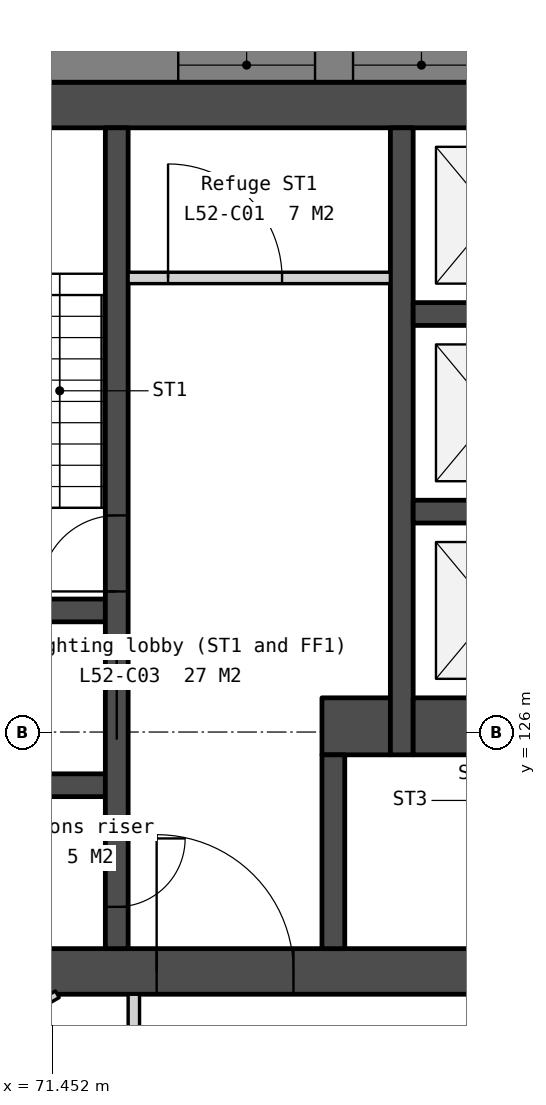
"""IFC4 building model, lengths in metres.
Left out: names, types, materials, properties, quantities, classifications, styles, units other than length and angle.
Written with IfcOpenShell. Run it as: python <this file> out.ifc"""

import sys

from ifc_helpers import new_model, si_unit, direction, frame, frame_2d, origin, place, context, subcontext, project, spatial, polyline, rectangle, outline, extrude, element, fill, save


model = new_model("IFC4")
c1 = context("Model", 3, precision=1e-05, world=origin(), true_north=direction((0.0, 1.0)))
c2 = subcontext(c1, "Body", "Model", "MODEL_VIEW")
j1 = project(units=[si_unit("LENGTHUNIT", "METRE"), si_unit("PLANEANGLEUNIT", "RADIAN")], contexts=[c1])
p1 = place(None, origin())
s1 = spatial("IfcSite", under=j1, at=p1, CompositionType="ELEMENT")
p2 = place(p1, origin())
s2 = spatial("IfcBuilding", under=s1, at=p2, CompositionType="ELEMENT")
p3 = place(p2, frame((0.0, 0.0, 207.5)))
s3 = spatial("IfcBuildingStorey", under=s2, at=p3, CompositionType="ELEMENT", Elevation=207.5)
p4 = place(p3, frame((69.0, 134.25, 0.0), z_axis=(0.0, 0.0, 1.0), x_axis=(1.0, 0.0, 0.0)))
e1 = element("IfcWall", 1, at=p4, inside=s3, PredefinedType="SOLIDWALL", context=c2, shape_type="SweptSolid", body=[
    extrude(rectangle(XDim=22.0, YDim=0.6, at=frame_2d((11.0, 0.0))), origin(), (0.0, 0.0, 1.0), 3.75),
])
p5 = place(p3, frame((69.0, 122.85, 0.0), z_axis=(0.0, 0.0, 1.0), x_axis=(1.0, 0.0, 0.0)))
e2 = element("IfcWall", 2, at=p5, inside=s3, PredefinedType="SOLIDWALL", context=c2, shape_type="SweptSolid", body=[
    extrude(rectangle(XDim=22.0, YDim=0.6, at=frame_2d((11.0, 0.0))), origin(), (0.0, 0.0, 1.0), 3.75),
])
p6 = place(p5, frame((16.375, 0.0, 0.0)))
e3 = element("IfcOpeningElement", 3, at=p6, cuts=e2, PredefinedType="OPENING", context=c2, shape_type="SweptSolid", body=[
    extrude(rectangle(XDim=1.8, YDim=2.1, at=frame_2d((0.9, 1.05))), frame((0.0, 0.31, 0.0), z_axis=(0.0, -1.0, 0.0), x_axis=(1.0, 0.0, 0.0)), (0.0, 0.0, 1.0), 0.62),
])
p7 = place(p5, frame((3.825, 0.0, 0.0)))
e4 = element("IfcOpeningElement", 4, at=p7, cuts=e2, PredefinedType="OPENING", context=c2, shape_type="SweptSolid", body=[
    extrude(rectangle(XDim=1.8, YDim=2.1, at=frame_2d((0.9, 1.05))), frame((0.0, 0.31, 0.0), z_axis=(0.0, -1.0, 0.0), x_axis=(1.0, 0.0, 0.0)), (0.0, 0.0, 1.0), 0.62),
])
p8 = place(p5, frame((12.85, 0.0, 0.0)))
e5 = element("IfcOpeningElement", 5, at=p8, cuts=e2, PredefinedType="OPENING", context=c2, shape_type="SweptSolid", body=[
    extrude(rectangle(XDim=1.5, YDim=2.1, at=frame_2d((0.75, 1.05))), frame((0.0, 0.31, 0.0), z_axis=(0.0, -1.0, 0.0), x_axis=(1.0, 0.0, 0.0)), (0.0, 0.0, 1.0), 0.62),
])
for number, where, z_axis, x_axis in (
    (6, (69.6, 127.6, 0.0), (0.0, 0.0, 1.0), (1.0, 0.0, 0.0)),
    (7, (69.6, 125.3, 0.0), (0.0, 0.0, 1.0), (1.0, 0.0, 0.0)),
):
    element("IfcWall", number, at=place(p3, frame(where, z_axis=z_axis, x_axis=x_axis)), inside=s3, PredefinedType="SOLIDWALL", context=c2, shape_type="SweptSolid", body=[
        extrude(rectangle(XDim=2.55, YDim=0.3, at=frame_2d((1.275, 0.0))), origin(), (0.0, 0.0, 1.0), 3.75),
    ])
p9 = place(p3, frame((72.3, 133.95, 0.0), z_axis=(0.0, 0.0, 1.0), x_axis=(0.0, -1.0, 0.0)))
e8 = element("IfcWall", 8, at=p9, inside=s3, PredefinedType="SOLIDWALL", context=c2, shape_type="SweptSolid", body=[
    extrude(rectangle(XDim=10.8, YDim=0.3, at=frame_2d((5.4, 0.0))), origin(), (0.0, 0.0, 1.0), 3.75),
])
p10 = place(p9, frame((6.95, 0.0, 0.0)))
e9 = element("IfcOpeningElement", 9, at=p10, cuts=e8, PredefinedType="OPENING", context=c2, shape_type="SweptSolid", body=[
    extrude(rectangle(XDim=1.1, YDim=2.1, at=frame_2d((0.55, 1.05))), frame((0.0, 0.16, 0.0), z_axis=(0.0, -1.0, 0.0), x_axis=(1.0, 0.0, 0.0)), (0.0, 0.0, 1.0), 0.32),
])
p11 = place(p9, frame((9.35, 0.0, 0.0)))
e10 = element("IfcOpeningElement", 10, at=p11, cuts=e8, PredefinedType="OPENING", context=c2, shape_type="SweptSolid", body=[
    extrude(rectangle(XDim=0.9, YDim=2.1, at=frame_2d((0.45, 1.05))), frame((0.0, 0.16, 0.0), z_axis=(0.0, -1.0, 0.0), x_axis=(1.0, 0.0, 0.0)), (0.0, 0.0, 1.0), 0.32),
])
p12 = place(p9, frame((5.1, 0.0, 0.0)))
e11 = element("IfcOpeningElement", 11, at=p12, cuts=e8, PredefinedType="OPENING", context=c2, shape_type="SweptSolid", body=[
    extrude(rectangle(XDim=1.0, YDim=2.1, at=frame_2d((0.5, 1.05))), frame((0.0, 0.16, 0.0), z_axis=(0.0, -1.0, 0.0), x_axis=(1.0, 0.0, 0.0)), (0.0, 0.0, 1.0), 0.32),
])
p13 = place(p3, frame((72.45, 131.975, 0.0), z_axis=(0.0, 0.0, 1.0), x_axis=(1.0, 0.0, 0.0)))
e12 = element("IfcWall", 12, at=p13, inside=s3, PredefinedType="PARTITIONING", context=c2, shape_type="SweptSolid", body=[
    extrude(rectangle(XDim=3.45, YDim=0.15, at=frame_2d((1.725, 0.0))), origin(), (0.0, 0.0, 1.0), 3.75),
])
p14 = place(p13, frame((0.525, 0.0, 0.0)))
e13 = element("IfcOpeningElement", 13, at=p14, cuts=e12, PredefinedType="OPENING", context=c2, shape_type="SweptSolid", body=[
    extrude(rectangle(XDim=1.5, YDim=2.1, at=frame_2d((0.75, 1.05))), frame((0.0, 0.085, 0.0), z_axis=(0.0, -1.0, 0.0), x_axis=(1.0, 0.0, 0.0)), (0.0, 0.0, 1.0), 0.17),
])
p15 = place(p3, frame((75.0, 126.075, 0.0), z_axis=(0.0, 0.0, 1.0), x_axis=(1.0, 0.0, 0.0)))
e14 = element("IfcWall", 14, at=p15, inside=s3, PredefinedType="SOLIDWALL", context=c2, shape_type="SweptSolid", body=[
    extrude(rectangle(XDim=0.9, YDim=0.75, at=frame_2d((0.45, 0.0))), origin(), (0.0, 0.0, 1.0), 3.75),
])
p16 = place(p3, frame((75.15, 125.7, 0.0), z_axis=(0.0, 0.0, 1.0), x_axis=(0.0, -1.0, 0.0)))
e15 = element("IfcWall", 15, at=p16, inside=s3, PredefinedType="SOLIDWALL", context=c2, shape_type="SweptSolid", body=[
    extrude(rectangle(XDim=2.55, YDim=0.3, at=frame_2d((1.275, 0.0))), origin(), (0.0, 0.0, 1.0), 3.75),
])
p17 = place(p3, frame((76.05, 133.95, 0.0), z_axis=(0.0, 0.0, 1.0), x_axis=(0.0, -1.0, 0.0)))
e16 = element("IfcWall", 16, at=p17, inside=s3, PredefinedType="SOLIDWALL", context=c2, shape_type="SweptSolid", body=[
    extrude(rectangle(XDim=8.25, YDim=0.3, at=frame_2d((4.125, 0.0))), origin(), (0.0, 0.0, 1.0), 3.75),
])
for number, where, z_axis, x_axis in (
    (17, (76.2, 131.5, 0.0), (0.0, 0.0, 1.0), (1.0, 0.0, 0.0)),
    (18, (76.2, 128.9, 0.0), (0.0, 0.0, 1.0), (1.0, 0.0, 0.0)),
):
    element("IfcWall", number, at=place(p3, frame(where, z_axis=z_axis, x_axis=x_axis)), inside=s3, PredefinedType="SOLIDWALL", context=c2, shape_type="SweptSolid", body=[
        extrude(rectangle(XDim=2.1, YDim=0.3, at=frame_2d((1.05, 0.0))), origin(), (0.0, 0.0, 1.0), 3.75),
    ])
p18 = place(p3, frame((76.2, 126.075, 0.0), z_axis=(0.0, 0.0, 1.0), x_axis=(1.0, 0.0, 0.0)))
e19 = element("IfcWall", 19, at=p18, inside=s3, PredefinedType="SOLIDWALL", context=c2, shape_type="SweptSolid", body=[
    extrude(rectangle(XDim=2.1, YDim=0.75, at=frame_2d((1.05, 0.0))), origin(), (0.0, 0.0, 1.0), 3.75),
])
p19 = place(p3, frame((99.365, 134.775, -0.15), z_axis=(0.0, 0.0, 1.0), x_axis=(-1.0, 0.0, 0.0)))
e20 = element("IfcWall", 20, at=p19, inside=s3, PredefinedType="SOLIDWALL", context=c2, shape_type="SweptSolid", body=[
    extrude(outline(polyline([(38.729, 0.0), (38.729, 3.9), (0.0, 3.9), (0.0, 0.0), (38.729, 0.0)])), frame((0.0, 0.225, 0.0), z_axis=(0.0, -1.0, 0.0), x_axis=(1.0, 0.0, 0.0)), (0.0, 0.0, 1.0), 0.45),
])
p20 = place(p19, frame((2.791, 0.0, 0.95)))
e21 = element("IfcOpeningElement", 21, at=p20, cuts=e20, PredefinedType="OPENING", context=c2, shape_type="SweptSolid", body=[
    extrude(rectangle(XDim=1.8, YDim=2.2, at=frame_2d((0.9, 1.1))), frame((0.0, 0.235, 0.0), z_axis=(0.0, -1.0, 0.0), x_axis=(1.0, 0.0, 0.0)), (0.0, 0.0, 1.0), 0.47),
])
p21 = place(p19, frame((5.091, 0.0, 0.95)))
e22 = element("IfcOpeningElement", 22, at=p21, cuts=e20, PredefinedType="OPENING", context=c2, shape_type="SweptSolid", body=[
    extrude(rectangle(XDim=1.8, YDim=2.2, at=frame_2d((0.9, 1.1))), frame((0.0, 0.235, 0.0), z_axis=(0.0, -1.0, 0.0), x_axis=(1.0, 0.0, 0.0)), (0.0, 0.0, 1.0), 0.47),
])
p22 = place(p19, frame((12.473, 0.0, 0.95)))
e23 = element("IfcOpeningElement", 23, at=p22, cuts=e20, PredefinedType="OPENING", context=c2, shape_type="SweptSolid", body=[
    extrude(rectangle(XDim=1.8, YDim=2.2, at=frame_2d((0.9, 1.1))), frame((0.0, 0.235, 0.0), z_axis=(0.0, -1.0, 0.0), x_axis=(1.0, 0.0, 0.0)), (0.0, 0.0, 1.0), 0.47),
])
p23 = place(p19, frame((14.773, 0.0, 0.95)))
e24 = element("IfcOpeningElement", 24, at=p23, cuts=e20, PredefinedType="OPENING", context=c2, shape_type="SweptSolid", body=[
    extrude(rectangle(XDim=1.8, YDim=2.2, at=frame_2d((0.9, 1.1))), frame((0.0, 0.235, 0.0), z_axis=(0.0, -1.0, 0.0), x_axis=(1.0, 0.0, 0.0)), (0.0, 0.0, 1.0), 0.47),
])
p24 = place(p19, frame((22.156, 0.0, 0.95)))
e25 = element("IfcOpeningElement", 25, at=p24, cuts=e20, PredefinedType="OPENING", context=c2, shape_type="SweptSolid", body=[
    extrude(rectangle(XDim=1.8, YDim=2.2, at=frame_2d((0.9, 1.1))), frame((0.0, 0.235, 0.0), z_axis=(0.0, -1.0, 0.0), x_axis=(1.0, 0.0, 0.0)), (0.0, 0.0, 1.0), 0.47),
])
p25 = place(p19, frame((24.456, 0.0, 0.95)))
e26 = element("IfcOpeningElement", 26, at=p25, cuts=e20, PredefinedType="OPENING", context=c2, shape_type="SweptSolid", body=[
    extrude(rectangle(XDim=1.8, YDim=2.2, at=frame_2d((0.9, 1.1))), frame((0.0, 0.235, 0.0), z_axis=(0.0, -1.0, 0.0), x_axis=(1.0, 0.0, 0.0)), (0.0, 0.0, 1.0), 0.47),
])
p26 = place(p19, frame((31.838, 0.0, 0.95)))
e27 = element("IfcOpeningElement", 27, at=p26, cuts=e20, PredefinedType="OPENING", context=c2, shape_type="SweptSolid", body=[
    extrude(rectangle(XDim=1.8, YDim=2.2, at=frame_2d((0.9, 1.1))), frame((0.0, 0.235, 0.0), z_axis=(0.0, -1.0, 0.0), x_axis=(1.0, 0.0, 0.0)), (0.0, 0.0, 1.0), 0.47),
])
p27 = place(p19, frame((34.138, 0.0, 0.95)))
e28 = element("IfcOpeningElement", 28, at=p27, cuts=e20, PredefinedType="OPENING", context=c2, shape_type="SweptSolid", body=[
    extrude(rectangle(XDim=1.8, YDim=2.2, at=frame_2d((0.9, 1.1))), frame((0.0, 0.235, 0.0), z_axis=(0.0, -1.0, 0.0), x_axis=(1.0, 0.0, 0.0)), (0.0, 0.0, 1.0), 0.47),
])
p28 = place(p3, frame((59.13, 132.168, -0.15), z_axis=(0.0, 0.0, 1.0), x_axis=(0.500002199942, -0.866024133644, 0.0)))
e29 = element("IfcWall", 29, at=p28, inside=s3, PredefinedType="SOLIDWALL", context=c2, shape_type="SweptSolid", body=[
    extrude(outline(polyline([(38.729, 0.0), (38.729, 3.9), (0.0, 3.9), (0.0, 0.0), (38.729, 0.0)])), frame((0.0, 0.225, 0.0), z_axis=(0.0, -1.0, 0.0), x_axis=(1.0, 0.0, 0.0)), (0.0, 0.0, 1.0), 0.45),
])
p29 = place(p28, frame((2.791, 0.0, 0.95)))
e30 = element("IfcOpeningElement", 30, at=p29, cuts=e29, PredefinedType="OPENING", context=c2, shape_type="SweptSolid", body=[
    extrude(rectangle(XDim=1.8, YDim=2.2, at=frame_2d((0.9, 1.1))), frame((0.0, 0.235, 0.0), z_axis=(0.0, -1.0, 0.0), x_axis=(1.0, 0.0, 0.0)), (0.0, 0.0, 1.0), 0.47),
])
p30 = place(p28, frame((5.091, 0.0, 0.95)))
e31 = element("IfcOpeningElement", 31, at=p30, cuts=e29, PredefinedType="OPENING", context=c2, shape_type="SweptSolid", body=[
    extrude(rectangle(XDim=1.8, YDim=2.2, at=frame_2d((0.9, 1.1))), frame((0.0, 0.235, 0.0), z_axis=(0.0, -1.0, 0.0), x_axis=(1.0, 0.0, 0.0)), (0.0, 0.0, 1.0), 0.47),
])
p31 = place(p28, frame((12.473, 0.0, 0.95)))
e32 = element("IfcOpeningElement", 32, at=p31, cuts=e29, PredefinedType="OPENING", context=c2, shape_type="SweptSolid", body=[
    extrude(rectangle(XDim=1.8, YDim=2.2, at=frame_2d((0.9, 1.1))), frame((0.0, 0.235, 0.0), z_axis=(0.0, -1.0, 0.0), x_axis=(1.0, 0.0, 0.0)), (0.0, 0.0, 1.0), 0.47),
])
p32 = place(p28, frame((14.773, 0.0, 0.95)))
e33 = element("IfcOpeningElement", 33, at=p32, cuts=e29, PredefinedType="OPENING", context=c2, shape_type="SweptSolid", body=[
    extrude(rectangle(XDim=1.8, YDim=2.2, at=frame_2d((0.9, 1.1))), frame((0.0, 0.235, 0.0), z_axis=(0.0, -1.0, 0.0), x_axis=(1.0, 0.0, 0.0)), (0.0, 0.0, 1.0), 0.47),
])
p33 = place(p28, frame((22.156, 0.0, 0.95)))
e34 = element("IfcOpeningElement", 34, at=p33, cuts=e29, PredefinedType="OPENING", context=c2, shape_type="SweptSolid", body=[
    extrude(rectangle(XDim=1.8, YDim=2.2, at=frame_2d((0.9, 1.1))), frame((0.0, 0.235, 0.0), z_axis=(0.0, -1.0, 0.0), x_axis=(1.0, 0.0, 0.0)), (0.0, 0.0, 1.0), 0.47),
])
p34 = place(p28, frame((24.456, 0.0, 0.95)))
e35 = element("IfcOpeningElement", 35, at=p34, cuts=e29, PredefinedType="OPENING", context=c2, shape_type="SweptSolid", body=[
    extrude(rectangle(XDim=1.8, YDim=2.2, at=frame_2d((0.9, 1.1))), frame((0.0, 0.235, 0.0), z_axis=(0.0, -1.0, 0.0), x_axis=(1.0, 0.0, 0.0)), (0.0, 0.0, 1.0), 0.47),
])
p35 = place(p28, frame((31.838, 0.0, 0.95)))
e36 = element("IfcOpeningElement", 36, at=p35, cuts=e29, PredefinedType="OPENING", context=c2, shape_type="SweptSolid", body=[
    extrude(rectangle(XDim=1.8, YDim=2.2, at=frame_2d((0.9, 1.1))), frame((0.0, 0.235, 0.0), z_axis=(0.0, -1.0, 0.0), x_axis=(1.0, 0.0, 0.0)), (0.0, 0.0, 1.0), 0.47),
])
p36 = place(p28, frame((34.138, 0.0, 0.95)))
e37 = element("IfcOpeningElement", 37, at=p36, cuts=e29, PredefinedType="OPENING", context=c2, shape_type="SweptSolid", body=[
    extrude(rectangle(XDim=1.8, YDim=2.2, at=frame_2d((0.9, 1.1))), frame((0.0, 0.235, 0.0), z_axis=(0.0, -1.0, 0.0), x_axis=(1.0, 0.0, 0.0)), (0.0, 0.0, 1.0), 0.47),
])
p37 = place(p3, frame((66.587, 119.703, 0.0), z_axis=(0.0, 0.0, 1.0), x_axis=(0.866023511746, 0.500003277092, 0.0)))
e38 = element("IfcWall", 38, at=p37, inside=s3, PredefinedType="PARTITIONING", context=c2, shape_type="SweptSolid", body=[
    extrude(rectangle(XDim=5.694, YDim=0.1, at=frame_2d((2.847, 0.0))), origin(), (0.0, 0.0, 1.0), 3.75),
])
p38 = place(p37, frame((2.397, 0.0, 0.0)))
e39 = element("IfcOpeningElement", 39, at=p38, cuts=e38, PredefinedType="OPENING", context=c2, shape_type="SweptSolid", body=[
    extrude(rectangle(XDim=0.9, YDim=2.1, at=frame_2d((0.45, 1.05))), frame((0.0, 0.06, 0.0), z_axis=(0.0, -1.0, 0.0), x_axis=(1.0, 0.0, 0.0)), (0.0, 0.0, 1.0), 0.12),
])
p39 = place(p3, frame((72.525, 119.875, 0.0), z_axis=(0.0, 0.0, 1.0), x_axis=(0.0, 1.0, 0.0)))
e40 = element("IfcWall", 40, at=p39, inside=s3, PredefinedType="PARTITIONING", context=c2, shape_type="SweptSolid", body=[
    extrude(rectangle(XDim=2.675, YDim=0.15, at=frame_2d((1.337, 0.0))), origin(), (0.0, 0.0, 1.0), 3.75),
])
p40 = place(p10, origin())
e41 = element("IfcDoor", 41, at=p40, inside=s3, OperationType="SLIDING_TO_LEFT", PredefinedType="DOOR", context=c2, shape_type="SweptSolid", body=[
    extrude(rectangle(XDim=1.1, YDim=2.1, at=frame_2d((0.55, 1.05))), frame((0.0, 0.025, 0.0), z_axis=(0.0, -1.0, 0.0), x_axis=(1.0, 0.0, 0.0)), (0.0, 0.0, 1.0), 0.05),
])
fill(e9, e41)
p41 = place(p7, origin())
e42 = element("IfcDoor", 42, at=p41, inside=s3, OperationType="DOUBLE_DOOR_DOUBLE_SWING", PredefinedType="DOOR", context=c2, shape_type="SweptSolid", body=[
    extrude(rectangle(XDim=1.8, YDim=2.1, at=frame_2d((0.9, 1.05))), frame((0.0, 0.025, 0.0), z_axis=(0.0, -1.0, 0.0), x_axis=(1.0, 0.0, 0.0)), (0.0, 0.0, 1.0), 0.05),
])
fill(e4, e42)
p42 = place(p14, origin())
e43 = element("IfcDoor", 43, at=p42, inside=s3, OperationType="DOUBLE_DOOR_DOUBLE_SWING", PredefinedType="DOOR", context=c2, shape_type="SweptSolid", body=[
    extrude(rectangle(XDim=1.5, YDim=2.1, at=frame_2d((0.75, 1.05))), frame((0.0, 0.025, 0.0), z_axis=(0.0, -1.0, 0.0), x_axis=(1.0, 0.0, 0.0)), (0.0, 0.0, 1.0), 0.05),
])
fill(e13, e43)
p43 = place(p11, origin())
e44 = element("IfcDoor", 44, at=p43, inside=s3, OperationType="SINGLE_SWING_LEFT", PredefinedType="DOOR", context=c2, shape_type="SweptSolid", body=[
    extrude(rectangle(XDim=0.9, YDim=2.1, at=frame_2d((0.45, 1.05))), frame((0.0, 0.025, 0.0), z_axis=(0.0, -1.0, 0.0), x_axis=(1.0, 0.0, 0.0)), (0.0, 0.0, 1.0), 0.05),
])
fill(e10, e44)
p44 = place(p12, origin())
e45 = element("IfcDoor", 45, at=p44, inside=s3, OperationType="SINGLE_SWING_RIGHT", PredefinedType="DOOR", context=c2, shape_type="SweptSolid", body=[
    extrude(rectangle(XDim=1.0, YDim=2.1, at=frame_2d((0.5, 1.05))), frame((0.0, 0.025, 0.0), z_axis=(0.0, -1.0, 0.0), x_axis=(1.0, 0.0, 0.0)), (0.0, 0.0, 1.0), 0.05),
])
fill(e11, e45)
p45 = place(p24, origin())
e46 = element("IfcWindow", 46, at=p45, inside=s3, PartitioningType="SINGLE_PANEL", PredefinedType="WINDOW", context=c2, shape_type="SweptSolid", body=[
    extrude(rectangle(XDim=1.8, YDim=2.2, at=frame_2d((0.9, 1.1))), frame((0.0, 0.03, 0.0), z_axis=(0.0, -1.0, 0.0), x_axis=(1.0, 0.0, 0.0)), (0.0, 0.0, 1.0), 0.06),
])
fill(e25, e46)
p46 = place(p25, origin())
e47 = element("IfcWindow", 47, at=p46, inside=s3, PartitioningType="SINGLE_PANEL", PredefinedType="WINDOW", context=c2, shape_type="SweptSolid", body=[
    extrude(rectangle(XDim=1.8, YDim=2.2, at=frame_2d((0.9, 1.1))), frame((0.0, 0.03, 0.0), z_axis=(0.0, -1.0, 0.0), x_axis=(1.0, 0.0, 0.0)), (0.0, 0.0, 1.0), 0.06),
])
fill(e26, e47)
save(model, sys.argv[1])
